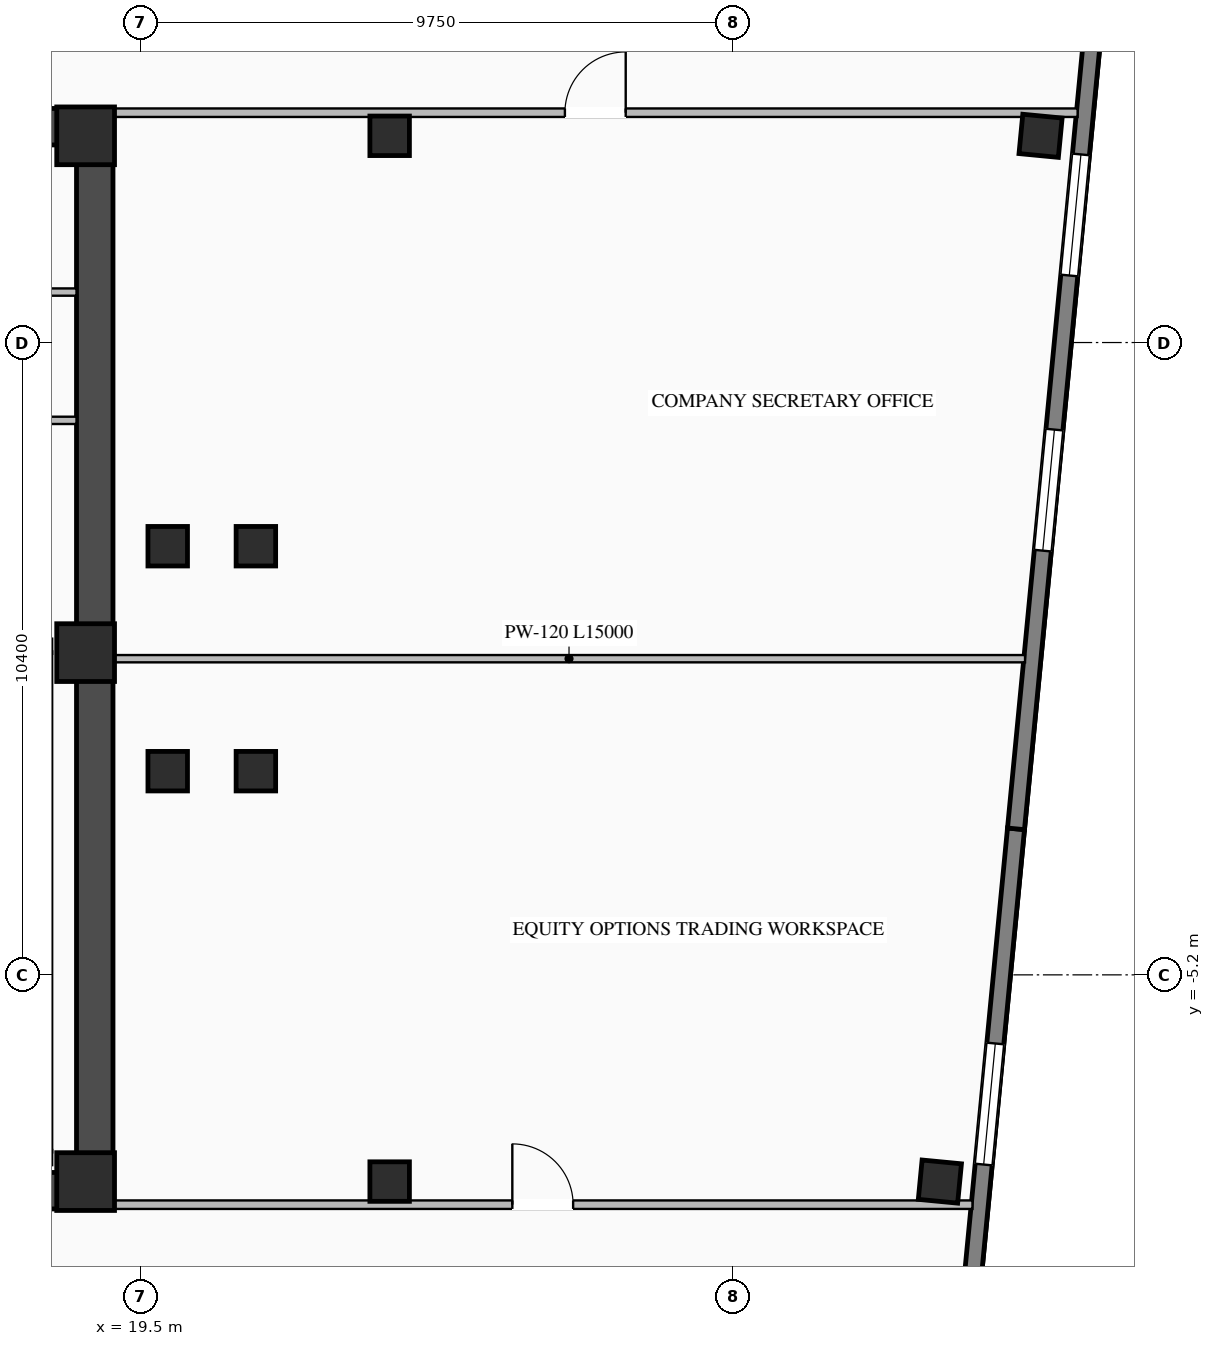
"""IFC4 building model, lengths in metres.
Left out: names, types, materials, properties, quantities, classifications, styles, units other than length and angle.
Written with IfcOpenShell. Run it as: python <this file> out.ifc"""

import sys

from ifc_helpers import new_model, si_unit, direction, frame, frame_2d, origin, origin_2d, place, context, subcontext, project, spatial, rectangle, i_section, extrude, element, fill, save


model = new_model("IFC4")
c1 = context("Model", 3, precision=1e-05, world=origin(), true_north=direction((0.0, 1.0)))
c2 = subcontext(c1, "Body", "Model", "MODEL_VIEW")
j1 = project(units=[si_unit("LENGTHUNIT", "METRE"), si_unit("PLANEANGLEUNIT", "RADIAN")], contexts=[c1])
p1 = place(None, origin())
s1 = spatial("IfcSite", under=j1, at=p1, CompositionType="ELEMENT")
p2 = place(p1, origin())
s2 = spatial("IfcBuilding", under=s1, at=p2, CompositionType="ELEMENT")
p3 = place(p2, frame((0.0, 0.0, 156.2)))
s3 = spatial("IfcBuildingStorey", under=s2, at=p3, CompositionType="ELEMENT", Elevation=156.2)
p4 = place(p3, frame((8.8, -8.75, 0.0), z_axis=(0.0, 0.0, 1.0), x_axis=(1.0, 0.0, 0.0)))
e1 = element("IfcWall", 1, at=p4, inside=s3, PredefinedType="SHEAR", context=c2, shape_type="SweptSolid", body=[
    extrude(rectangle(XDim=10.25, YDim=0.6, at=frame_2d((5.125, 0.0))), origin(), (0.0, 0.0, 1.0), 4.02),
])
p5 = place(p3, frame((8.8, 8.75, 0.0), z_axis=(0.0, 0.0, 1.0), x_axis=(1.0, 0.0, 0.0)))
e2 = element("IfcWall", 2, at=p5, inside=s3, PredefinedType="SHEAR", context=c2, shape_type="SweptSolid", body=[
    extrude(rectangle(XDim=10.25, YDim=0.6, at=frame_2d((5.125, 0.0))), origin(), (0.0, 0.0, 1.0), 4.02),
])
p6 = place(p5, frame((3.25, 0.0, 0.0)))
e3 = element("IfcOpeningElement", 3, at=p6, cuts=e2, PredefinedType="OPENING", context=c2, shape_type="SweptSolid", body=[
    extrude(rectangle(XDim=1.4, YDim=2.05, at=frame_2d((0.7, 1.025))), frame((0.0, 0.31, 0.0), z_axis=(0.0, -1.0, 0.0), x_axis=(1.0, 0.0, 0.0)), (0.0, 0.0, 1.0), 0.62),
])
p7 = place(p3, frame((18.75, -8.45, 0.0), z_axis=(0.0, 0.0, 1.0), x_axis=(0.0, 1.0, 0.0)))
e4 = element("IfcWall", 4, at=p7, inside=s3, PredefinedType="SHEAR", context=c2, shape_type="SweptSolid", body=[
    extrude(rectangle(XDim=16.9, YDim=0.6, at=frame_2d((8.45, 0.0))), origin(), (0.0, 0.0, 1.0), 4.02),
])
for number, where, z_axis, x_axis in (
    (5, (18.6, -8.6, 0.0), (0.0, 0.0, 1.0), (1.0, 0.0, 0.0)),
    (6, (18.6, 0.1, 0.0), (0.0, 0.0, 1.0), (1.0, 0.0, 0.0)),
    (7, (18.6, 8.6, 0.0), (0.0, 0.0, 1.0), (1.0, 0.0, 0.0)),
):
    element("IfcColumn", number, at=place(p3, frame(where, z_axis=z_axis, x_axis=x_axis)), inside=s3, PredefinedType="COLUMN", context=c2, shape_type="SweptSolid", body=[
        extrude(rectangle(XDim=0.95, YDim=0.95, at=origin_2d()), origin(), (0.0, 0.0, 1.0), 4.2),
    ])
for number, where, z_axis, x_axis in (
    (8, (19.95, -1.85, 0.0), (0.0, 0.0, 1.0), (1.0, 0.0, 0.0)),
    (9, (19.95, 1.85, 0.0), (0.0, 0.0, 1.0), (1.0, 0.0, 0.0)),
    (10, (21.4, -1.85, 0.0), (0.0, 0.0, 1.0), (1.0, 0.0, 0.0)),
    (11, (21.4, 1.85, 0.0), (0.0, 0.0, 1.0), (1.0, 0.0, 0.0)),
    (12, (23.6, -8.6, 0.0), (0.0, 0.0, 1.0), (1.0, 0.0, 0.0)),
    (13, (23.6, 8.6, 0.0), (0.0, 0.0, 1.0), (1.0, 0.0, 0.0)),
):
    element("IfcColumn", number, at=place(p3, frame(where, z_axis=z_axis, x_axis=x_axis)), inside=s3, PredefinedType="COLUMN", context=c2, shape_type="SweptSolid", body=[
        extrude(i_section(OverallWidth=0.65, OverallDepth=0.65, WebThickness=0.028, FlangeThickness=0.04, at=origin_2d()), origin(), (0.0, 0.0, 1.0), 4.2),
    ])
for number, where, z_axis, x_axis in (
    (14, (32.649, -8.6, -0.28), (0.0, 0.0, 1.0), (0.995, -0.096, 0.0)),
    (15, (34.305, 8.6, -0.28), (0.0, 0.0, 1.0), (0.995, -0.096, 0.0)),
):
    element("IfcColumn", number, at=place(p3, frame(where, z_axis=z_axis, x_axis=x_axis)), inside=s3, PredefinedType="COLUMN", context=c2, shape_type="SweptSolid", body=[
        extrude(i_section(OverallWidth=0.65, OverallDepth=0.65, WebThickness=0.028, FlangeThickness=0.04, at=origin_2d()), origin(), (0.0, 0.0, 1.0), 4.48),
    ])
p8 = place(p3, frame((33.901, -2.798, 0.0), z_axis=(0.0, 0.0, 1.0), x_axis=(-0.095853434568, -0.99539545864, 0.0)))
e16 = element("IfcWall", 16, at=p8, inside=s3, PredefinedType="STANDARD", context=c2, shape_type="SweptSolid", body=[
    extrude(rectangle(XDim=16.79, YDim=0.28, at=frame_2d((8.395, 0.0))), origin(), (0.0, 0.0, 1.0), 4.0),
])
p9 = place(p8, frame((3.547, 0.0, 0.76)))
e17 = element("IfcOpeningElement", 17, at=p9, cuts=e16, PredefinedType="OPENING", context=c2, shape_type="SweptSolid", body=[
    extrude(rectangle(XDim=2.0, YDim=2.05, at=frame_2d((1.0, 1.025))), frame((0.0, 0.15, 0.0), z_axis=(0.0, -1.0, 0.0), x_axis=(1.0, 0.0, 0.0)), (0.0, 0.0, 1.0), 0.3),
])
p10 = place(p8, frame((10.193, 0.0, 0.76)))
e18 = element("IfcOpeningElement", 18, at=p10, cuts=e16, PredefinedType="OPENING", context=c2, shape_type="SweptSolid", body=[
    extrude(rectangle(XDim=2.0, YDim=2.05, at=frame_2d((1.0, 1.025))), frame((0.0, 0.15, 0.0), z_axis=(0.0, -1.0, 0.0), x_axis=(1.0, 0.0, 0.0)), (0.0, 0.0, 1.0), 0.3),
])
p11 = place(p3, frame((35.51, 13.914, 0.0), z_axis=(0.0, 0.0, 1.0), x_axis=(-0.095839027265, -0.995396845913, 0.0)))
e19 = element("IfcWall", 19, at=p11, inside=s3, PredefinedType="STANDARD", context=c2, shape_type="SweptSolid", body=[
    extrude(rectangle(XDim=16.79, YDim=0.28, at=frame_2d((8.395, 0.0))), origin(), (0.0, 0.0, 1.0), 4.0),
])
p12 = place(p11, frame((5.647, 0.0, 0.76)))
e20 = element("IfcOpeningElement", 20, at=p12, cuts=e19, PredefinedType="OPENING", context=c2, shape_type="SweptSolid", body=[
    extrude(rectangle(XDim=2.0, YDim=2.05, at=frame_2d((1.0, 1.025))), frame((0.0, 0.15, 0.0), z_axis=(0.0, -1.0, 0.0), x_axis=(1.0, 0.0, 0.0)), (0.0, 0.0, 1.0), 0.3),
])
p13 = place(p11, frame((10.193, 0.0, 0.76)))
e21 = element("IfcOpeningElement", 21, at=p13, cuts=e19, PredefinedType="OPENING", context=c2, shape_type="SweptSolid", body=[
    extrude(rectangle(XDim=2.0, YDim=2.05, at=frame_2d((1.0, 1.025))), frame((0.0, 0.15, 0.0), z_axis=(0.0, -1.0, 0.0), x_axis=(1.0, 0.0, 0.0)), (0.0, 0.0, 1.0), 0.3),
])
p14 = place(p3, frame((13.9, 3.92, 0.0), z_axis=(0.0, 0.0, 1.0), x_axis=(1.0, 0.0, 0.0)))
e22 = element("IfcWall", 22, at=p14, inside=s3, PredefinedType="STANDARD", context=c2, shape_type="SweptSolid", body=[
    extrude(rectangle(XDim=4.55, YDim=0.12, at=frame_2d((2.275, 0.0))), origin(), (0.0, 0.0, 1.0), 4.0),
])
p15 = place(p3, frame((16.15, 6.03, 0.0), z_axis=(0.0, 0.0, 1.0), x_axis=(1.0, 0.0, 0.0)))
e23 = element("IfcWall", 23, at=p15, inside=s3, PredefinedType="STANDARD", context=c2, shape_type="SweptSolid", body=[
    extrude(rectangle(XDim=2.3, YDim=0.12, at=frame_2d((1.15, 0.0))), origin(), (0.0, 0.0, 1.0), 4.0),
])
p16 = place(p3, frame((19.05, 8.98, 0.0), z_axis=(0.0, 0.0, 1.0), x_axis=(1.0, 0.0, 0.0)))
e24 = element("IfcWall", 24, at=p16, inside=s3, PredefinedType="STANDARD", context=c2, shape_type="SweptSolid", body=[
    extrude(rectangle(XDim=15.864, YDim=0.14, at=frame_2d((7.932, 0.0))), origin(), (0.0, 0.0, 1.0), 4.0),
])
p17 = place(p16, frame((7.432, 0.0, 0.0)))
e25 = element("IfcOpeningElement", 25, at=p17, cuts=e24, PredefinedType="OPENING", context=c2, shape_type="SweptSolid", body=[
    extrude(rectangle(XDim=1.0, YDim=2.08, at=frame_2d((0.5, 1.04))), frame((0.0, 0.08, 0.0), z_axis=(0.0, -1.0, 0.0), x_axis=(1.0, 0.0, 0.0)), (0.0, 0.0, 1.0), 0.16),
])
p18 = place(p3, frame((19.05, -8.98, 0.0), z_axis=(0.0, 0.0, 1.0), x_axis=(1.0, 0.0, 0.0)))
e26 = element("IfcWall", 26, at=p18, inside=s3, PredefinedType="STANDARD", context=c2, shape_type="SweptSolid", body=[
    extrude(rectangle(XDim=14.135, YDim=0.14, at=frame_2d((7.067, 0.0))), origin(), (0.0, 0.0, 1.0), 4.0),
])
p19 = place(p18, frame((6.567, 0.0, 0.0)))
e27 = element("IfcOpeningElement", 27, at=p19, cuts=e26, PredefinedType="OPENING", context=c2, shape_type="SweptSolid", body=[
    extrude(rectangle(XDim=1.0, YDim=2.08, at=frame_2d((0.5, 1.04))), frame((0.0, 0.08, 0.0), z_axis=(0.0, -1.0, 0.0), x_axis=(1.0, 0.0, 0.0)), (0.0, 0.0, 1.0), 0.16),
])
p20 = place(p3, frame((19.05, 0.0, 0.0), z_axis=(0.0, 0.0, 1.0), x_axis=(1.0, 0.0, 0.0)))
e28 = element("IfcWall", 28, at=p20, inside=s3, PredefinedType="STANDARD", context=c2, shape_type="SweptSolid", body=[
    extrude(rectangle(XDim=15.0, YDim=0.12, at=frame_2d((7.5, 0.0))), origin(), (0.0, 0.0, 1.0), 3.545),
])
p21 = place(p9, origin())
e29 = element("IfcWindow", 29, at=p21, inside=s3, PartitioningType="DOUBLE_PANEL_VERTICAL", PredefinedType="WINDOW", context=c2, shape_type="SweptSolid", body=[
    extrude(rectangle(XDim=2.0, YDim=2.05, at=frame_2d((1.0, 1.025))), frame((0.0, 0.03, 0.0), z_axis=(0.0, -1.0, 0.0), x_axis=(1.0, 0.0, 0.0)), (0.0, 0.0, 1.0), 0.06),
])
fill(e17, e29)
p22 = place(p12, origin())
e30 = element("IfcWindow", 30, at=p22, inside=s3, PartitioningType="DOUBLE_PANEL_VERTICAL", PredefinedType="WINDOW", context=c2, shape_type="SweptSolid", body=[
    extrude(rectangle(XDim=2.0, YDim=2.05, at=frame_2d((1.0, 1.025))), frame((0.0, 0.03, 0.0), z_axis=(0.0, -1.0, 0.0), x_axis=(1.0, 0.0, 0.0)), (0.0, 0.0, 1.0), 0.06),
])
fill(e20, e30)
p23 = place(p13, origin())
e31 = element("IfcWindow", 31, at=p23, inside=s3, PartitioningType="DOUBLE_PANEL_VERTICAL", PredefinedType="WINDOW", context=c2, shape_type="SweptSolid", body=[
    extrude(rectangle(XDim=2.0, YDim=2.05, at=frame_2d((1.0, 1.025))), frame((0.0, 0.03, 0.0), z_axis=(0.0, -1.0, 0.0), x_axis=(1.0, 0.0, 0.0)), (0.0, 0.0, 1.0), 0.06),
])
fill(e21, e31)
p24 = place(p17, origin())
e32 = element("IfcDoor", 32, at=p24, inside=s3, OperationType="SINGLE_SWING_RIGHT", PredefinedType="DOOR", context=c2, shape_type="SweptSolid", body=[
    extrude(rectangle(XDim=1.0, YDim=2.08, at=frame_2d((0.5, 1.04))), frame((0.0, 0.025, 0.0), z_axis=(0.0, -1.0, 0.0), x_axis=(1.0, 0.0, 0.0)), (0.0, 0.0, 1.0), 0.05),
])
fill(e25, e32)
p25 = place(p19, origin())
e33 = element("IfcDoor", 33, at=p25, inside=s3, OperationType="SINGLE_SWING_LEFT", PredefinedType="DOOR", context=c2, shape_type="SweptSolid", body=[
    extrude(rectangle(XDim=1.0, YDim=2.08, at=frame_2d((0.5, 1.04))), frame((0.0, 0.025, 0.0), z_axis=(0.0, -1.0, 0.0), x_axis=(1.0, 0.0, 0.0)), (0.0, 0.0, 1.0), 0.05),
])
fill(e27, e33)
save(model, sys.argv[1])
